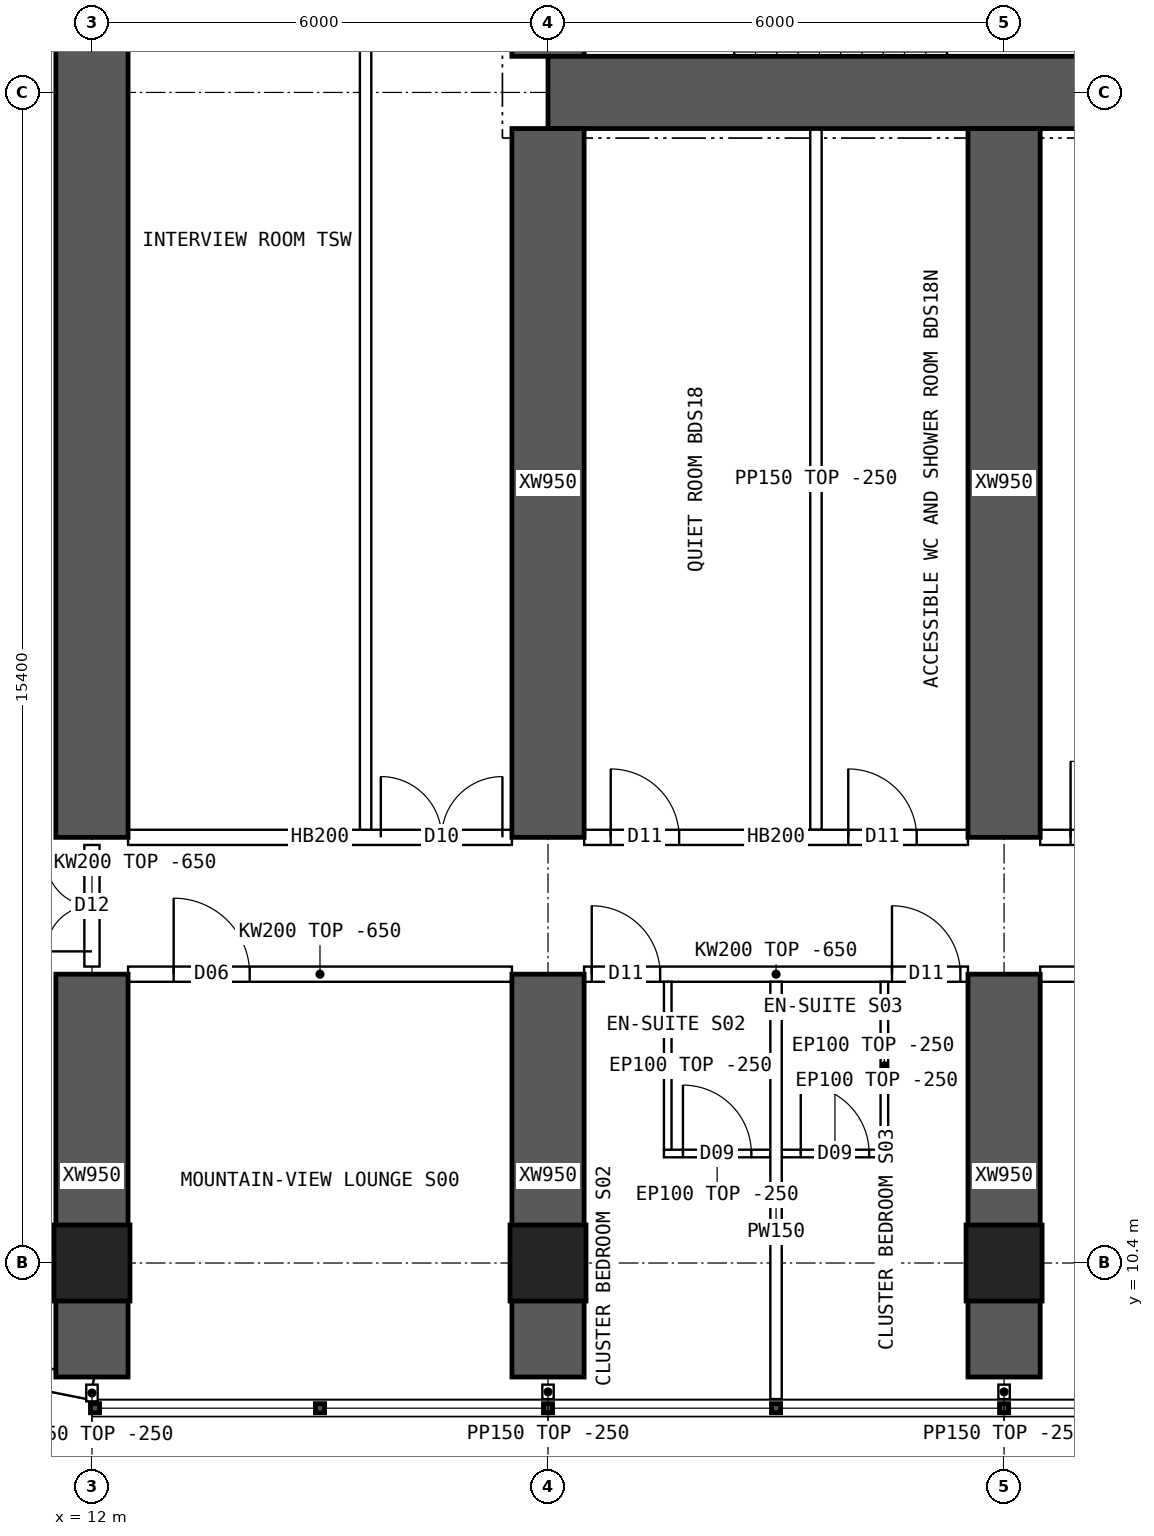
"""IFC4 building model, lengths in metres.
Left out: names, types, materials, properties, quantities, classifications, styles, units other than length and angle.
Written with IfcOpenShell. Run it as: python <this file> out.ifc"""

import sys

from ifc_helpers import new_model, si_unit, direction, frame, frame_2d, origin, origin_2d, place, context, subcontext, project, spatial, polyline, rectangle, hollow_rectangle, outline, extrude, element, fill, save


model = new_model("IFC4")
c1 = context("Model", 3, precision=1e-05, world=origin(), true_north=direction((0.0, 1.0)))
c2 = subcontext(c1, "Body", "Model", "MODEL_VIEW")
j1 = project(units=[si_unit("LENGTHUNIT", "METRE"), si_unit("PLANEANGLEUNIT", "RADIAN")], contexts=[c1])
p1 = place(None, origin())
s1 = spatial("IfcSite", under=j1, at=p1, CompositionType="ELEMENT")
p2 = place(p1, origin())
s2 = spatial("IfcBuilding", under=s1, at=p2, CompositionType="ELEMENT")
p3 = place(p2, frame((0.0, 0.0, 91.9)))
s3 = spatial("IfcBuildingStorey", under=s2, at=p3, CompositionType="ELEMENT", Elevation=91.9)
for number, where, z_axis, x_axis in (
    (1, (12.0, 10.4, 0.0), (0.0, 0.0, 1.0), (1.0, 0.0, 0.0)),
    (2, (18.0, 10.4, 0.0), (0.0, 0.0, 1.0), (1.0, 0.0, 0.0)),
    (3, (24.0, 10.4, 0.0), (0.0, 0.0, 1.0), (1.0, 0.0, 0.0)),
):
    element("IfcColumn", number, at=place(p3, frame(where, z_axis=z_axis, x_axis=x_axis)), inside=s3, PredefinedType="COLUMN", context=c2, shape_type="SweptSolid", body=[
        extrude(hollow_rectangle(XDim=1.0, YDim=1.0, WallThickness=0.1, at=origin_2d()), origin(), (0.0, 0.0, 1.0), 3.75),
    ])
p4 = place(p3, frame((18.0, 25.8, 0.0), z_axis=(0.0, 0.0, 1.0), x_axis=(1.0, 0.0, 0.0)))
e4 = element("IfcWall", 4, at=p4, inside=s3, PredefinedType="SHEAR", context=c2, shape_type="SweptSolid", body=[
    extrude(rectangle(XDim=48.0, YDim=0.95, at=frame_2d((24.0, 0.0))), origin(), (0.0, 0.0, 1.0), 3.75),
])
p5 = place(p3, frame((18.0, 26.275, 0.0), z_axis=(0.0, 0.0, 1.0), x_axis=(0.0, 1.0, 0.0)))
e5 = element("IfcWall", 5, at=p5, inside=s3, PredefinedType="SHEAR", context=c2, shape_type="SweptSolid", body=[
    extrude(rectangle(XDim=11.45, YDim=0.95, at=frame_2d((5.725, 0.0))), origin(), (0.0, 0.0, 1.0), 3.75),
])
p6 = place(p5, frame((5.025, 0.0, 0.0)))
e6 = element("IfcOpeningElement", 6, at=p6, cuts=e5, PredefinedType="OPENING", context=c2, shape_type="SweptSolid", body=[
    extrude(rectangle(XDim=1.2, YDim=2.1, at=frame_2d((0.6, 1.05))), frame((0.0, 0.485, 0.0), z_axis=(0.0, -1.0, 0.0), x_axis=(1.0, 0.0, 0.0)), (0.0, 0.0, 1.0), 0.97),
])
p7 = place(p3, frame((12.0, 8.9, 0.0), z_axis=(0.0, 0.0, 1.0), x_axis=(0.0, 1.0, 0.0)))
e7 = element("IfcWall", 7, at=p7, inside=s3, PredefinedType="SHEAR", context=c2, shape_type="SweptSolid", body=[
    extrude(rectangle(XDim=5.3, YDim=0.95, at=frame_2d((2.65, 0.0))), origin(), (0.0, 0.0, 1.0), 3.75),
])
p8 = place(p3, frame((12.0, 16.0, 0.0), z_axis=(0.0, 0.0, 1.0), x_axis=(0.0, 1.0, 0.0)))
e8 = element("IfcWall", 8, at=p8, inside=s3, PredefinedType="SHEAR", context=c2, shape_type="SweptSolid", body=[
    extrude(rectangle(XDim=32.0, YDim=0.95, at=frame_2d((16.0, 0.0))), origin(), (0.0, 0.0, 1.0), 3.75),
])
p9 = place(p3, frame((18.0, 8.9, 0.0), z_axis=(0.0, 0.0, 1.0), x_axis=(0.0, 1.0, 0.0)))
e9 = element("IfcWall", 9, at=p9, inside=s3, PredefinedType="SHEAR", context=c2, shape_type="SweptSolid", body=[
    extrude(rectangle(XDim=5.3, YDim=0.95, at=frame_2d((2.65, 0.0))), origin(), (0.0, 0.0, 1.0), 3.75),
])
p10 = place(p3, frame((18.0, 16.0, 0.0), z_axis=(0.0, 0.0, 1.0), x_axis=(0.0, 1.0, 0.0)))
e10 = element("IfcWall", 10, at=p10, inside=s3, PredefinedType="SHEAR", context=c2, shape_type="SweptSolid", body=[
    extrude(rectangle(XDim=9.325, YDim=0.95, at=frame_2d((4.663, 0.0))), origin(), (0.0, 0.0, 1.0), 3.75),
])
p11 = place(p3, frame((24.0, 8.9, 0.0), z_axis=(0.0, 0.0, 1.0), x_axis=(0.0, 1.0, 0.0)))
e11 = element("IfcWall", 11, at=p11, inside=s3, PredefinedType="SHEAR", context=c2, shape_type="SweptSolid", body=[
    extrude(rectangle(XDim=5.3, YDim=0.95, at=frame_2d((2.65, 0.0))), origin(), (0.0, 0.0, 1.0), 3.75),
])
p12 = place(p3, frame((24.0, 16.0, 0.0), z_axis=(0.0, 0.0, 1.0), x_axis=(0.0, 1.0, 0.0)))
e12 = element("IfcWall", 12, at=p12, inside=s3, PredefinedType="SHEAR", context=c2, shape_type="SweptSolid", body=[
    extrude(rectangle(XDim=9.325, YDim=0.95, at=frame_2d((4.663, 0.0))), origin(), (0.0, 0.0, 1.0), 3.75),
])
p13 = place(p3, frame((8.843, 9.378, 0.0), z_axis=(0.0, 0.0, 1.0), x_axis=(0.980787251524, -0.195080412259, 0.0)))
e13 = element("IfcWall", 13, at=p13, inside=s3, PredefinedType="SOLIDWALL", context=c2, shape_type="SweptSolid", body=[
    extrude(outline(polyline([(-0.03, -0.15), (3.249, -0.15), (3.189, 0.15), (0.03, 0.15), (-0.03, -0.15)])), origin(), (0.0, 0.0, 1.0), 3.5),
])
p14 = place(p13, frame((0.909, 0.0, 0.9)))
e14 = element("IfcOpeningElement", 14, at=p14, cuts=e13, PredefinedType="OPENING", context=c2, shape_type="SweptSolid", body=[
    extrude(rectangle(XDim=1.4, YDim=1.8, at=frame_2d((0.7, 0.9))), frame((0.0, 0.16, 0.0), z_axis=(0.0, -1.0, 0.0), x_axis=(1.0, 0.0, 0.0)), (0.0, 0.0, 1.0), 0.32),
])
p15 = place(p3, frame((12.475, 14.2, 0.0), z_axis=(0.0, 0.0, 1.0), x_axis=(1.0, 0.0, 0.0)))
e15 = element("IfcWall", 15, at=p15, inside=s3, PredefinedType="SOLIDWALL", context=c2, shape_type="SweptSolid", body=[
    extrude(outline(polyline([(0.0, 0.0), (5.05, 0.0), (5.05, 3.1), (0.0, 3.1), (0.0, 0.0)])), frame((0.0, 0.1, 0.0), z_axis=(0.0, -1.0, 0.0), x_axis=(1.0, 0.0, 0.0)), (0.0, 0.0, 1.0), 0.2),
])
p16 = place(p15, frame((0.6, 0.0, 0.0)))
e16 = element("IfcOpeningElement", 16, at=p16, cuts=e15, PredefinedType="OPENING", context=c2, shape_type="SweptSolid", body=[
    extrude(rectangle(XDim=1.0, YDim=2.1, at=frame_2d((0.5, 1.05))), frame((0.0, 0.11, 0.0), z_axis=(0.0, -1.0, 0.0), x_axis=(1.0, 0.0, 0.0)), (0.0, 0.0, 1.0), 0.22),
])
p17 = place(p3, frame((12.475, 16.0, 0.0), z_axis=(0.0, 0.0, 1.0), x_axis=(1.0, 0.0, 0.0)))
e17 = element("IfcWall", 17, at=p17, inside=s3, PredefinedType="SOLIDWALL", context=c2, shape_type="SweptSolid", body=[
    extrude(rectangle(XDim=5.05, YDim=0.2, at=frame_2d((2.525, 0.0))), origin(), (0.0, 0.0, 1.0), 3.5),
])
p18 = place(p17, frame((3.325, 0.0, 0.0)))
e18 = element("IfcOpeningElement", 18, at=p18, cuts=e17, PredefinedType="OPENING", context=c2, shape_type="SweptSolid", body=[
    extrude(rectangle(XDim=1.6, YDim=2.1, at=frame_2d((0.8, 1.05))), frame((0.0, 0.11, 0.0), z_axis=(0.0, -1.0, 0.0), x_axis=(1.0, 0.0, 0.0)), (0.0, 0.0, 1.0), 0.22),
])
p19 = place(p3, frame((18.475, 14.2, 0.0), z_axis=(0.0, 0.0, 1.0), x_axis=(1.0, 0.0, 0.0)))
e19 = element("IfcWall", 19, at=p19, inside=s3, PredefinedType="SOLIDWALL", context=c2, shape_type="SweptSolid", body=[
    extrude(outline(polyline([(0.0, 0.0), (5.05, 0.0), (5.05, 3.1), (0.0, 3.1), (0.0, 0.0)])), frame((0.0, 0.1, 0.0), z_axis=(0.0, -1.0, 0.0), x_axis=(1.0, 0.0, 0.0)), (0.0, 0.0, 1.0), 0.2),
])
p20 = place(p19, frame((0.1, 0.0, 0.0)))
e20 = element("IfcOpeningElement", 20, at=p20, cuts=e19, PredefinedType="OPENING", context=c2, shape_type="SweptSolid", body=[
    extrude(rectangle(XDim=0.9, YDim=2.1, at=frame_2d((0.45, 1.05))), frame((0.0, 0.11, 0.0), z_axis=(0.0, -1.0, 0.0), x_axis=(1.0, 0.0, 0.0)), (0.0, 0.0, 1.0), 0.22),
])
p21 = place(p19, frame((4.05, 0.0, 0.0)))
e21 = element("IfcOpeningElement", 21, at=p21, cuts=e19, PredefinedType="OPENING", context=c2, shape_type="SweptSolid", body=[
    extrude(rectangle(XDim=0.9, YDim=2.1, at=frame_2d((0.45, 1.05))), frame((0.0, 0.11, 0.0), z_axis=(0.0, -1.0, 0.0), x_axis=(1.0, 0.0, 0.0)), (0.0, 0.0, 1.0), 0.22),
])
p22 = place(p3, frame((18.475, 16.0, 0.0), z_axis=(0.0, 0.0, 1.0), x_axis=(1.0, 0.0, 0.0)))
e22 = element("IfcWall", 22, at=p22, inside=s3, PredefinedType="SOLIDWALL", context=c2, shape_type="SweptSolid", body=[
    extrude(rectangle(XDim=5.05, YDim=0.2, at=frame_2d((2.525, 0.0))), origin(), (0.0, 0.0, 1.0), 3.5),
])
p23 = place(p22, frame((0.35, 0.0, 0.0)))
e23 = element("IfcOpeningElement", 23, at=p23, cuts=e22, PredefinedType="OPENING", context=c2, shape_type="SweptSolid", body=[
    extrude(rectangle(XDim=0.9, YDim=2.1, at=frame_2d((0.45, 1.05))), frame((0.0, 0.11, 0.0), z_axis=(0.0, -1.0, 0.0), x_axis=(1.0, 0.0, 0.0)), (0.0, 0.0, 1.0), 0.22),
])
p24 = place(p22, frame((3.475, 0.0, 0.0)))
e24 = element("IfcOpeningElement", 24, at=p24, cuts=e22, PredefinedType="OPENING", context=c2, shape_type="SweptSolid", body=[
    extrude(rectangle(XDim=0.9, YDim=2.1, at=frame_2d((0.45, 1.05))), frame((0.0, 0.11, 0.0), z_axis=(0.0, -1.0, 0.0), x_axis=(1.0, 0.0, 0.0)), (0.0, 0.0, 1.0), 0.22),
])
p25 = place(p3, frame((24.475, 14.2, 0.0), z_axis=(0.0, 0.0, 1.0), x_axis=(1.0, 0.0, 0.0)))
e25 = element("IfcWall", 25, at=p25, inside=s3, PredefinedType="SOLIDWALL", context=c2, shape_type="SweptSolid", body=[
    extrude(outline(polyline([(0.0, 0.0), (5.05, 0.0), (5.05, 3.1), (0.0, 3.1), (0.0, 0.0)])), frame((0.0, 0.1, 0.0), z_axis=(0.0, -1.0, 0.0), x_axis=(1.0, 0.0, 0.0)), (0.0, 0.0, 1.0), 0.2),
])
p26 = place(p25, frame((0.6, 0.0, 0.0)))
e26 = element("IfcOpeningElement", 26, at=p26, cuts=e25, PredefinedType="OPENING", context=c2, shape_type="SweptSolid", body=[
    extrude(rectangle(XDim=1.0, YDim=2.1, at=frame_2d((0.5, 1.05))), frame((0.0, 0.11, 0.0), z_axis=(0.0, -1.0, 0.0), x_axis=(1.0, 0.0, 0.0)), (0.0, 0.0, 1.0), 0.22),
])
p27 = place(p3, frame((24.475, 16.0, 0.0), z_axis=(0.0, 0.0, 1.0), x_axis=(1.0, 0.0, 0.0)))
e27 = element("IfcWall", 27, at=p27, inside=s3, PredefinedType="SOLIDWALL", context=c2, shape_type="SweptSolid", body=[
    extrude(rectangle(XDim=5.05, YDim=0.2, at=frame_2d((2.525, 0.0))), origin(), (0.0, 0.0, 1.0), 3.5),
])
p28 = place(p27, frame((0.4, 0.0, 0.0)))
e28 = element("IfcOpeningElement", 28, at=p28, cuts=e27, PredefinedType="OPENING", context=c2, shape_type="SweptSolid", body=[
    extrude(rectangle(XDim=1.0, YDim=2.1, at=frame_2d((0.5, 1.05))), frame((0.0, 0.11, 0.0), z_axis=(0.0, -1.0, 0.0), x_axis=(1.0, 0.0, 0.0)), (0.0, 0.0, 1.0), 0.22),
])
p29 = place(p3, frame((21.0, 8.61, 0.0), z_axis=(0.0, 0.0, 1.0), x_axis=(0.0, 1.0, 0.0)))
e29 = element("IfcWall", 29, at=p29, inside=s3, PredefinedType="PARTITIONING", context=c2, shape_type="SweptSolid", body=[
    extrude(outline(polyline([(0.0, 0.0), (5.49, 0.0), (5.49, 3.1), (5.442, 3.1), (5.44, 3.5), (1.992, 3.5), (1.99, 3.1), (1.592, 3.1), (1.59, 3.5), (0.0, 3.5), (0.0, 0.0)])), frame((0.0, 0.075, 0.0), z_axis=(0.0, -1.0, 0.0), x_axis=(1.0, 0.0, 0.0)), (0.0, 0.0, 1.0), 0.15),
])
p30 = place(p3, frame((20.925, 11.841, 0.0), z_axis=(0.0, 0.0, 1.0), x_axis=(-1.0, 0.0, 0.0)))
e30 = element("IfcWall", 30, at=p30, inside=s3, PredefinedType="PARTITIONING", context=c2, shape_type="SweptSolid", body=[
    extrude(rectangle(XDim=1.4, YDim=0.1, at=frame_2d((0.7, 0.0))), origin(), (0.0, 0.0, 1.0), 3.5),
])
p31 = place(p30, frame((0.25, 0.0, 0.0)))
e31 = element("IfcOpeningElement", 31, at=p31, cuts=e30, PredefinedType="OPENING", context=c2, shape_type="SweptSolid", body=[
    extrude(rectangle(XDim=0.9, YDim=2.1, at=frame_2d((0.45, 1.05))), frame((0.0, 0.06, 0.0), z_axis=(0.0, -1.0, 0.0), x_axis=(1.0, 0.0, 0.0)), (0.0, 0.0, 1.0), 0.12),
])
p32 = place(p3, frame((19.575, 11.891, 0.0), z_axis=(0.0, 0.0, 1.0), x_axis=(0.0, 1.0, 0.0)))
e32 = element("IfcWall", 32, at=p32, inside=s3, PredefinedType="PARTITIONING", context=c2, shape_type="SweptSolid", body=[
    extrude(outline(polyline([(0.0, 0.0), (2.209, 0.0), (2.209, 3.1), (2.161, 3.1), (2.159, 3.5), (0.0, 3.5), (0.0, 0.0)])), frame((0.0, 0.05, 0.0), z_axis=(0.0, -1.0, 0.0), x_axis=(1.0, 0.0, 0.0)), (0.0, 0.0, 1.0), 0.1),
])
p33 = place(p3, frame((22.475, 11.841, 0.0), z_axis=(0.0, 0.0, 1.0), x_axis=(-1.0, 0.0, 0.0)))
e33 = element("IfcWall", 33, at=p33, inside=s3, PredefinedType="PARTITIONING", context=c2, shape_type="SweptSolid", body=[
    extrude(rectangle(XDim=1.4, YDim=0.1, at=frame_2d((0.7, 0.0))), origin(), (0.0, 0.0, 1.0), 3.5),
])
p34 = place(p33, frame((0.25, 0.0, 0.0)))
e34 = element("IfcOpeningElement", 34, at=p34, cuts=e33, PredefinedType="OPENING", context=c2, shape_type="SweptSolid", body=[
    extrude(rectangle(XDim=0.9, YDim=2.1, at=frame_2d((0.45, 1.05))), frame((0.0, 0.06, 0.0), z_axis=(0.0, -1.0, 0.0), x_axis=(1.0, 0.0, 0.0)), (0.0, 0.0, 1.0), 0.12),
])
p35 = place(p3, frame((22.425, 11.891, 0.0), z_axis=(0.0, 0.0, 1.0), x_axis=(0.0, 1.0, 0.0)))
e35 = element("IfcWall", 35, at=p35, inside=s3, PredefinedType="PARTITIONING", context=c2, shape_type="SweptSolid", body=[
    extrude(outline(polyline([(0.0, 0.0), (2.209, 0.0), (2.209, 3.1), (2.161, 3.1), (2.159, 3.5), (0.0, 3.5), (0.0, 0.0)])), frame((0.0, 0.05, 0.0), z_axis=(0.0, -1.0, 0.0), x_axis=(1.0, 0.0, 0.0)), (0.0, 0.0, 1.0), 0.1),
])
p36 = place(p3, frame((21.525, 16.1, 0.0), z_axis=(0.0, 0.0, 1.0), x_axis=(0.0, 1.0, 0.0)))
e36 = element("IfcWall", 36, at=p36, inside=s3, PredefinedType="PARTITIONING", context=c2, shape_type="SweptSolid", body=[
    extrude(rectangle(XDim=9.225, YDim=0.15, at=frame_2d((4.612, 0.0))), origin(), (0.0, 0.0, 1.0), 3.5),
])
p37 = place(p3, frame((15.6, 16.1, 0.0), z_axis=(0.0, 0.0, 1.0), x_axis=(0.0, 1.0, 0.0)))
e37 = element("IfcWall", 37, at=p37, inside=s3, PredefinedType="PARTITIONING", context=c2, shape_type="SweptSolid", body=[
    extrude(rectangle(XDim=31.8, YDim=0.15, at=frame_2d((15.9, 0.0))), origin(), (0.0, 0.0, 1.0), 3.5),
])
p38 = place(p37, frame((13.5, 0.0, 0.0)))
e38 = element("IfcOpeningElement", 38, at=p38, cuts=e37, PredefinedType="OPENING", context=c2, shape_type="SweptSolid", body=[
    extrude(rectangle(XDim=1.0, YDim=2.1, at=frame_2d((0.5, 1.05))), frame((0.0, 0.085, 0.0), z_axis=(0.0, -1.0, 0.0), x_axis=(1.0, 0.0, 0.0)), (0.0, 0.0, 1.0), 0.17),
])
p39 = place(p37, frame((16.5, 0.0, 0.0)))
e39 = element("IfcOpeningElement", 39, at=p39, cuts=e37, PredefinedType="OPENING", context=c2, shape_type="SweptSolid", body=[
    extrude(rectangle(XDim=1.0, YDim=2.1, at=frame_2d((0.5, 1.05))), frame((0.0, 0.085, 0.0), z_axis=(0.0, -1.0, 0.0), x_axis=(1.0, 0.0, 0.0)), (0.0, 0.0, 1.0), 0.17),
])
p40 = place(p3, frame((12.0, 14.3, 0.0), z_axis=(0.0, 0.0, 1.0), x_axis=(0.0, 1.0, 0.0)))
e40 = element("IfcWall", 40, at=p40, inside=s3, PredefinedType="SOLIDWALL", context=c2, shape_type="SweptSolid", body=[
    extrude(outline(polyline([(0.0, 0.0), (1.6, 0.0), (1.6, 3.1), (0.0, 3.1), (0.0, 0.0)])), frame((0.0, 0.1, 0.0), z_axis=(0.0, -1.0, 0.0), x_axis=(1.0, 0.0, 0.0)), (0.0, 0.0, 1.0), 0.2),
])
p41 = place(p40, frame((0.2, 0.0, 0.0)))
e41 = element("IfcOpeningElement", 41, at=p41, cuts=e40, PredefinedType="OPENING", context=c2, shape_type="SweptSolid", body=[
    extrude(rectangle(XDim=1.2, YDim=2.1, at=frame_2d((0.6, 1.05))), frame((0.0, 0.11, 0.0), z_axis=(0.0, -1.0, 0.0), x_axis=(1.0, 0.0, 0.0)), (0.0, 0.0, 1.0), 0.22),
])
p42 = place(p3, frame((12.0, 8.8, 0.0), z_axis=(0.0, 0.0, 1.0), x_axis=(0.0, -1.0, 0.0)))
e42 = element("IfcWall", 42, at=p42, inside=s3, PredefinedType="PARTITIONING", context=c2, shape_type="SweptSolid", body=[
    extrude(rectangle(XDim=0.22, YDim=0.15, at=frame_2d((0.11, 0.0))), origin(), (0.0, 0.0, 1.0), 3.5),
])
for number, where, z_axis, x_axis in (
    (43, (18.0, 8.8, 0.0), (0.0, 0.0, 1.0), (0.0, -1.0, 0.0)),
    (44, (24.0, 8.8, 0.0), (0.0, 0.0, 1.0), (0.0, -1.0, 0.0)),
):
    element("IfcWall", number, at=place(p3, frame(where, z_axis=z_axis, x_axis=x_axis)), inside=s3, PredefinedType="PARTITIONING", context=c2, shape_type="SweptSolid", body=[
        extrude(rectangle(XDim=0.19, YDim=0.15, at=frame_2d((0.095, 0.0))), origin(), (0.0, 0.0, 1.0), 3.5),
    ])
p43 = place(p18, origin())
e45 = element("IfcDoor", 45, at=p43, inside=s3, OperationType="DOUBLE_DOOR_SINGLE_SWING", PredefinedType="DOOR", context=c2, shape_type="SweptSolid", body=[
    extrude(rectangle(XDim=1.6, YDim=2.1, at=frame_2d((0.8, 1.05))), frame((0.0, 0.025, 0.0), z_axis=(0.0, -1.0, 0.0), x_axis=(1.0, 0.0, 0.0)), (0.0, 0.0, 1.0), 0.05),
])
fill(e18, e45)
p44 = place(p16, origin())
e46 = element("IfcDoor", 46, at=p44, inside=s3, OperationType="SINGLE_SWING_LEFT", PredefinedType="DOOR", context=c2, shape_type="SweptSolid", body=[
    extrude(rectangle(XDim=1.0, YDim=2.1, at=frame_2d((0.5, 1.05))), frame((0.0, 0.025, 0.0), z_axis=(0.0, -1.0, 0.0), x_axis=(1.0, 0.0, 0.0)), (0.0, 0.0, 1.0), 0.05),
])
fill(e16, e46)
p45 = place(p31, origin())
e47 = element("IfcDoor", 47, at=p45, inside=s3, OperationType="SINGLE_SWING_RIGHT", PredefinedType="DOOR", context=c2, shape_type="SweptSolid", body=[
    extrude(rectangle(XDim=0.9, YDim=2.1, at=frame_2d((0.45, 1.05))), frame((0.0, 0.025, 0.0), z_axis=(0.0, -1.0, 0.0), x_axis=(1.0, 0.0, 0.0)), (0.0, 0.0, 1.0), 0.05),
])
fill(e31, e47)
p46 = place(p20, origin())
e48 = element("IfcDoor", 48, at=p46, inside=s3, OperationType="SINGLE_SWING_LEFT", PredefinedType="DOOR", context=c2, shape_type="SweptSolid", body=[
    extrude(rectangle(XDim=0.9, YDim=2.1, at=frame_2d((0.45, 1.05))), frame((0.0, 0.025, 0.0), z_axis=(0.0, -1.0, 0.0), x_axis=(1.0, 0.0, 0.0)), (0.0, 0.0, 1.0), 0.05),
])
fill(e20, e48)
p47 = place(p34, origin())
e49 = element("IfcDoor", 49, at=p47, inside=s3, OperationType="SINGLE_SWING_RIGHT", PredefinedType="DOOR", context=c2, shape_type="SweptSolid", body=[
    extrude(rectangle(XDim=0.9, YDim=2.1, at=frame_2d((0.45, 1.05))), frame((0.0, 0.025, 0.0), z_axis=(0.0, -1.0, 0.0), x_axis=(1.0, 0.0, 0.0)), (0.0, 0.0, 1.0), 0.05),
])
fill(e34, e49)
p48 = place(p21, origin())
e50 = element("IfcDoor", 50, at=p48, inside=s3, OperationType="SINGLE_SWING_LEFT", PredefinedType="DOOR", context=c2, shape_type="SweptSolid", body=[
    extrude(rectangle(XDim=0.9, YDim=2.1, at=frame_2d((0.45, 1.05))), frame((0.0, 0.025, 0.0), z_axis=(0.0, -1.0, 0.0), x_axis=(1.0, 0.0, 0.0)), (0.0, 0.0, 1.0), 0.05),
])
fill(e21, e50)
p49 = place(p23, origin())
e51 = element("IfcDoor", 51, at=p49, inside=s3, OperationType="SINGLE_SWING_LEFT", PredefinedType="DOOR", context=c2, shape_type="SweptSolid", body=[
    extrude(rectangle(XDim=0.9, YDim=2.1, at=frame_2d((0.45, 1.05))), frame((0.0, 0.025, 0.0), z_axis=(0.0, -1.0, 0.0), x_axis=(1.0, 0.0, 0.0)), (0.0, 0.0, 1.0), 0.05),
])
fill(e23, e51)
p50 = place(p24, origin())
e52 = element("IfcDoor", 52, at=p50, inside=s3, OperationType="SINGLE_SWING_LEFT", PredefinedType="DOOR", context=c2, shape_type="SweptSolid", body=[
    extrude(rectangle(XDim=0.9, YDim=2.1, at=frame_2d((0.45, 1.05))), frame((0.0, 0.025, 0.0), z_axis=(0.0, -1.0, 0.0), x_axis=(1.0, 0.0, 0.0)), (0.0, 0.0, 1.0), 0.05),
])
fill(e24, e52)
p51 = place(p28, origin())
e53 = element("IfcDoor", 53, at=p51, inside=s3, OperationType="SINGLE_SWING_LEFT", PredefinedType="DOOR", context=c2, shape_type="SweptSolid", body=[
    extrude(rectangle(XDim=1.0, YDim=2.1, at=frame_2d((0.5, 1.05))), frame((0.0, 0.025, 0.0), z_axis=(0.0, -1.0, 0.0), x_axis=(1.0, 0.0, 0.0)), (0.0, 0.0, 1.0), 0.05),
])
fill(e28, e53)
p52 = place(p41, origin())
e54 = element("IfcDoor", 54, at=p52, inside=s3, OperationType="DOUBLE_DOOR_SINGLE_SWING", PredefinedType="DOOR", context=c2, shape_type="SweptSolid", body=[
    extrude(rectangle(XDim=1.2, YDim=2.1, at=frame_2d((0.6, 1.05))), frame((0.0, 0.025, 0.0), z_axis=(0.0, -1.0, 0.0), x_axis=(1.0, 0.0, 0.0)), (0.0, 0.0, 1.0), 0.05),
])
fill(e41, e54)
save(model, sys.argv[1])
